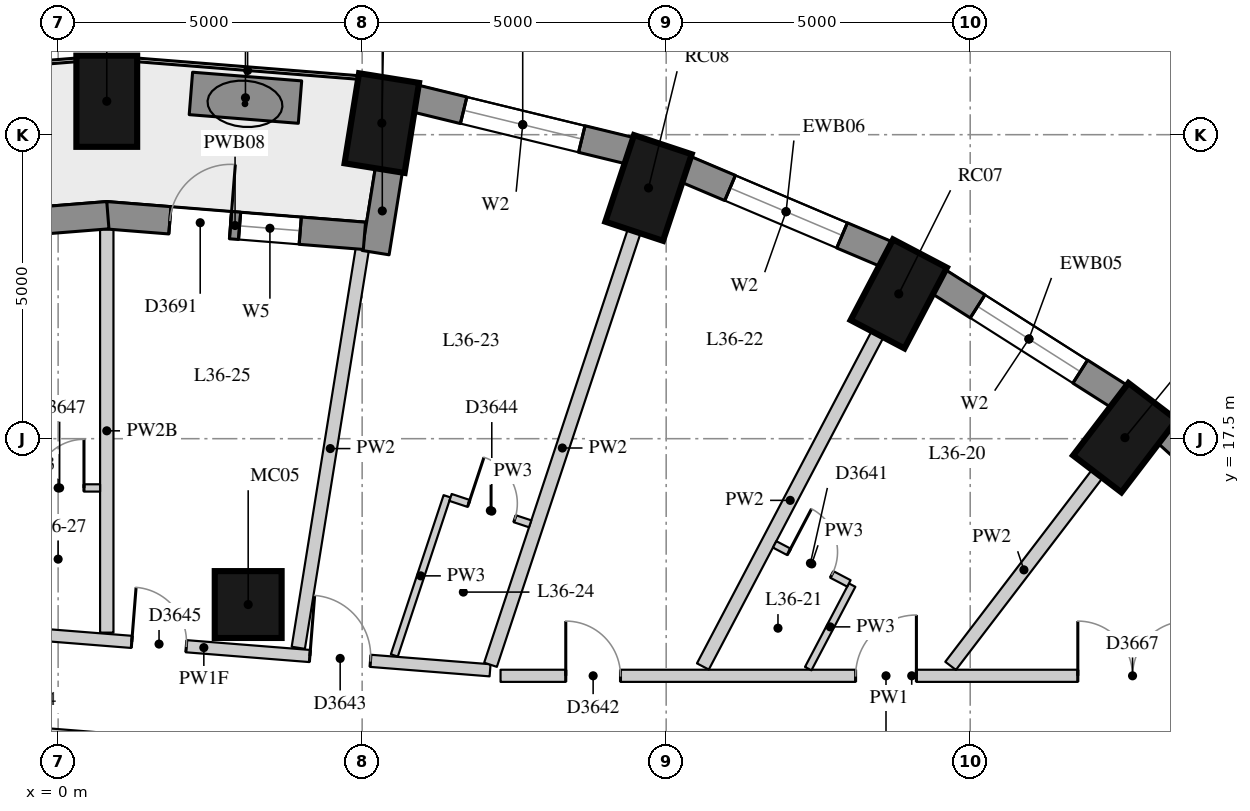
"""IFC4 building model, lengths in metres.
Left out: names, types, materials, properties, quantities, classifications, styles, units other than length and angle.
Written with IfcOpenShell. Run it as: python <this file> out.ifc"""

import sys

from ifc_helpers import new_model, si_unit, direction, frame, frame_2d, origin, origin_2d, place, context, subcontext, project, spatial, rectangle, extrude, element, fill, save


model = new_model("IFC4")
c1 = context("Model", 3, precision=1e-05, world=origin(), true_north=direction((0.0, 1.0)))
c2 = subcontext(c1, "Body", "Model", "MODEL_VIEW")
j1 = project(units=[si_unit("LENGTHUNIT", "METRE"), si_unit("PLANEANGLEUNIT", "RADIAN")], contexts=[c1])
p1 = place(None, origin())
s1 = spatial("IfcSite", under=j1, at=p1, CompositionType="ELEMENT")
p2 = place(p1, origin())
s2 = spatial("IfcBuilding", under=s1, at=p2, CompositionType="ELEMENT")
p3 = place(p2, frame((0.0, 0.0, 128.5)))
s3 = spatial("IfcBuildingStorey", under=s2, at=p3, CompositionType="ELEMENT", Elevation=128.5)
for number, where, z_axis, x_axis in (
    (1, (17.545, 17.517, 0.0), (0.0, 0.0, 1.0), (0.607, 0.795, 0.0)),
    (2, (13.825, 19.882, 0.0), (0.0, 0.0, 1.0), (0.465, 0.885, 0.0)),
    (3, (9.71, 21.624, 0.0), (0.0, 0.0, 1.0), (0.315, 0.949, 0.0)),
    (4, (5.323, 22.691, 0.0), (0.0, 0.0, 1.0), (0.159, 0.987, 0.0)),
    (5, (0.8, 23.05, 0.0), (0.0, 0.0, 1.0), (0.0, 1.0, 0.0)),
):
    element("IfcColumn", number, at=place(p3, frame(where, z_axis=z_axis, x_axis=x_axis)), inside=s3, PredefinedType="COLUMN", context=c2, shape_type="SweptSolid", body=[
        extrude(rectangle(XDim=1.5, YDim=1.0, at=origin_2d()), origin(), (0.0, 0.0, 1.0), 3.3),
    ])
p4 = place(p3, frame((3.126, 14.772, 0.0), z_axis=(0.0, 0.0, 1.0), x_axis=(1.0, 0.0, 0.0)))
e6 = element("IfcColumn", 6, at=p4, inside=s3, PredefinedType="COLUMN", context=c2, shape_type="SweptSolid", body=[
    extrude(rectangle(XDim=1.1, YDim=1.1, at=origin_2d()), origin(), (0.0, 0.0, 1.0), 3.3),
])
p5 = place(p3, frame((20.784, 15.281, 0.0), z_axis=(0.0, 0.0, 1.0), x_axis=(-0.74032902847, 0.672244694739, 0.0)))
e7 = element("IfcWall", 7, at=p5, inside=s3, PredefinedType="SOLIDWALL", context=c2, shape_type="SweptSolid", body=[
    extrude(rectangle(XDim=3.464, YDim=0.45, at=frame_2d((1.732, 0.0))), origin(), (0.0, 0.0, 1.0), 3.02),
])
p6 = place(p3, frame((17.456, 18.192, 0.0), z_axis=(0.0, 0.0, 1.0), x_axis=(-0.843880549131, 0.536531097699, 0.0)))
e8 = element("IfcWall", 8, at=p6, inside=s3, PredefinedType="SOLIDWALL", context=c2, shape_type="SweptSolid", body=[
    extrude(rectangle(XDim=3.532, YDim=0.45, at=frame_2d((1.766, 0.0))), origin(), (0.0, 0.0, 1.0), 3.02),
])
p7 = place(p6, frame((0.766, 0.0, 0.4)))
e9 = element("IfcOpeningElement", 9, at=p7, cuts=e8, PredefinedType="OPENING", context=c2, shape_type="SweptSolid", body=[
    extrude(rectangle(XDim=2.0, YDim=1.75, at=frame_2d((1.0, 0.875))), frame((0.0, 0.235, 0.0), z_axis=(0.0, -1.0, 0.0), x_axis=(1.0, 0.0, 0.0)), (0.0, 0.0, 1.0), 0.47),
])
p8 = place(p3, frame((13.625, 20.533, 0.0), z_axis=(0.0, 0.0, 1.0), x_axis=(-0.920869643542, 0.389870619055, 0.0)))
e10 = element("IfcWall", 10, at=p8, inside=s3, PredefinedType="SOLIDWALL", context=c2, shape_type="SweptSolid", body=[
    extrude(rectangle(XDim=3.591, YDim=0.45, at=frame_2d((1.796, 0.0))), origin(), (0.0, 0.0, 1.0), 3.02),
])
p9 = place(p8, frame((0.796, 0.0, 0.4)))
e11 = element("IfcOpeningElement", 11, at=p9, cuts=e10, PredefinedType="OPENING", context=c2, shape_type="SweptSolid", body=[
    extrude(rectangle(XDim=2.0, YDim=1.75, at=frame_2d((1.0, 0.875))), frame((0.0, 0.235, 0.0), z_axis=(0.0, -1.0, 0.0), x_axis=(1.0, 0.0, 0.0)), (0.0, 0.0, 1.0), 0.47),
])
p10 = place(p3, frame((9.406, 22.235, 0.0), z_axis=(0.0, 0.0, 1.0), x_axis=(-0.971667603162, 0.236351579148, 0.0)))
e12 = element("IfcWall", 12, at=p10, inside=s3, PredefinedType="SOLIDWALL", context=c2, shape_type="SweptSolid", body=[
    extrude(rectangle(XDim=3.635, YDim=0.45, at=frame_2d((1.817, 0.0))), origin(), (0.0, 0.0, 1.0), 3.02),
])
p11 = place(p10, frame((0.817, 0.0, 0.4)))
e13 = element("IfcOpeningElement", 13, at=p11, cuts=e12, PredefinedType="OPENING", context=c2, shape_type="SweptSolid", body=[
    extrude(rectangle(XDim=2.0, YDim=1.75, at=frame_2d((1.0, 0.875))), frame((0.0, 0.235, 0.0), z_axis=(0.0, -1.0, 0.0), x_axis=(1.0, 0.0, 0.0)), (0.0, 0.0, 1.0), 0.47),
])
p12 = place(p3, frame((5.441, 21.932, 0.0), z_axis=(0.0, 0.0, 1.0), x_axis=(-0.158586380547, -0.987345106792, 0.0)))
e14 = element("IfcWall", 14, at=p12, inside=s3, PredefinedType="SOLIDWALL", context=c2, shape_type="SweptSolid", body=[
    extrude(rectangle(XDim=1.39, YDim=0.45, at=frame_2d((0.695, 0.0))), origin(), (0.0, 0.0, 1.0), 3.02),
])
p13 = place(p3, frame((5.038, 20.837, 0.0), z_axis=(0.0, 0.0, 1.0), x_axis=(-0.996839780714, 0.079438350855, 0.0)))
e15 = element("IfcWall", 15, at=p13, inside=s3, PredefinedType="SOLIDWALL", context=c2, shape_type="SweptSolid", body=[
    extrude(rectangle(XDim=4.269, YDim=0.45, at=frame_2d((2.134, 0.0))), origin(), (0.0, 0.0, 1.0), 3.02),
])
p14 = place(p13, frame((1.06, 0.0, 0.4)))
e16 = element("IfcOpeningElement", 16, at=p14, cuts=e15, PredefinedType="OPENING", context=c2, shape_type="SweptSolid", body=[
    extrude(rectangle(XDim=1.0, YDim=1.75, at=frame_2d((0.5, 0.875))), frame((0.0, 0.235, 0.0), z_axis=(0.0, -1.0, 0.0), x_axis=(1.0, 0.0, 0.0)), (0.0, 0.0, 1.0), 0.47),
])
p15 = place(p13, frame((2.209, 0.0, 0.0)))
e17 = element("IfcOpeningElement", 17, at=p15, cuts=e15, PredefinedType="OPENING", context=c2, shape_type="SweptSolid", body=[
    extrude(rectangle(XDim=1.0, YDim=2.15, at=frame_2d((0.5, 1.075))), frame((0.0, 0.235, 0.0), z_axis=(0.0, -1.0, 0.0), x_axis=(1.0, 0.0, 0.0)), (0.0, 0.0, 1.0), 0.47),
])
p16 = place(p3, frame((0.818, 21.176, 0.0), z_axis=(0.0, 0.0, 1.0), x_axis=(-0.996843824935, -0.079387585235, 0.0)))
e18 = element("IfcWall", 18, at=p16, inside=s3, PredefinedType="SOLIDWALL", context=c2, shape_type="SweptSolid", body=[
    extrude(rectangle(XDim=4.287, YDim=0.45, at=frame_2d((2.144, 0.0))), origin(), (0.0, 0.0, 1.0), 3.02),
])
p17 = place(p16, frame((1.068, 0.0, 0.4)))
e19 = element("IfcOpeningElement", 19, at=p17, cuts=e18, PredefinedType="OPENING", context=c2, shape_type="SweptSolid", body=[
    extrude(rectangle(XDim=1.0, YDim=1.75, at=frame_2d((0.5, 0.875))), frame((0.0, 0.235, 0.0), z_axis=(0.0, -1.0, 0.0), x_axis=(1.0, 0.0, 0.0)), (0.0, 0.0, 1.0), 0.47),
])
p18 = place(p16, frame((2.219, 0.0, 0.0)))
e20 = element("IfcOpeningElement", 20, at=p18, cuts=e18, PredefinedType="OPENING", context=c2, shape_type="SweptSolid", body=[
    extrude(rectangle(XDim=1.0, YDim=2.15, at=frame_2d((0.5, 1.075))), frame((0.0, 0.235, 0.0), z_axis=(0.0, -1.0, 0.0), x_axis=(1.0, 0.0, 0.0)), (0.0, 0.0, 1.0), 0.47),
])
p19 = place(p3, frame((3.978, 23.036, 0.0), z_axis=(0.0, 0.0, 1.0), x_axis=(-0.996858257414, 0.079206152698, 0.0)))
e21 = element("IfcWall", 21, at=p19, inside=s3, PredefinedType="USERDEFINED", context=c2, shape_type="SweptSolid", body=[
    extrude(rectangle(XDim=1.8, YDim=0.7, at=frame_2d((0.9, 0.0))), origin(), (0.0, 0.0, 1.0), 0.75),
])
p20 = place(p3, frame((-2.311, 14.437, 0.0), z_axis=(0.0, 0.0, 1.0), x_axis=(0.996870762165, -0.079048615048, 0.0)))
e22 = element("IfcWall", 22, at=p20, inside=s3, PredefinedType="PARTITIONING", context=c2, shape_type="SweptSolid", body=[
    extrude(rectangle(XDim=9.445, YDim=0.2, at=frame_2d((4.722, 0.0))), origin(), (0.0, 0.0, 1.0), 2.42),
])
p21 = place(p20, frame((6.471, 0.0, 0.0)))
e23 = element("IfcOpeningElement", 23, at=p21, cuts=e22, PredefinedType="OPENING", context=c2, shape_type="SweptSolid", body=[
    extrude(rectangle(XDim=1.0, YDim=2.1, at=frame_2d((0.5, 1.05))), frame((0.0, 0.11, 0.0), z_axis=(0.0, -1.0, 0.0), x_axis=(1.0, 0.0, 0.0)), (0.0, 0.0, 1.0), 0.22),
])
p22 = place(p20, frame((3.533, 0.0, 0.0)))
e24 = element("IfcOpeningElement", 24, at=p22, cuts=e22, PredefinedType="OPENING", context=c2, shape_type="SweptSolid", body=[
    extrude(rectangle(XDim=0.9, YDim=2.1, at=frame_2d((0.45, 1.05))), frame((0.0, 0.11, 0.0), z_axis=(0.0, -1.0, 0.0), x_axis=(1.0, 0.0, 0.0)), (0.0, 0.0, 1.0), 0.22),
])
p23 = place(p20, frame((0.22, 0.0, 0.0)))
e25 = element("IfcOpeningElement", 25, at=p23, cuts=e22, PredefinedType="OPENING", context=c2, shape_type="SweptSolid", body=[
    extrude(rectangle(XDim=1.0, YDim=2.1, at=frame_2d((0.5, 1.05))), frame((0.0, 0.11, 0.0), z_axis=(0.0, -1.0, 0.0), x_axis=(1.0, 0.0, 0.0)), (0.0, 0.0, 1.0), 0.22),
])
p24 = place(p3, frame((7.276, 13.6, 0.0), z_axis=(0.0, 0.0, 1.0), x_axis=(1.0, 0.0, 0.0)))
e26 = element("IfcWall", 26, at=p24, inside=s3, PredefinedType="PARTITIONING", context=c2, shape_type="SweptSolid", body=[
    extrude(rectangle(XDim=13.524, YDim=0.2, at=frame_2d((6.762, 0.0))), origin(), (0.0, 0.0, 1.0), 3.02),
])
p25 = place(p24, frame((5.839, 0.0, 0.0)))
e27 = element("IfcOpeningElement", 27, at=p25, cuts=e26, PredefinedType="OPENING", context=c2, shape_type="SweptSolid", body=[
    extrude(rectangle(XDim=1.0, YDim=2.1, at=frame_2d((0.5, 1.05))), frame((0.0, 0.11, 0.0), z_axis=(0.0, -1.0, 0.0), x_axis=(1.0, 0.0, 0.0)), (0.0, 0.0, 1.0), 0.22),
])
p26 = place(p24, frame((1.073, 0.0, 0.0)))
e28 = element("IfcOpeningElement", 28, at=p26, cuts=e26, PredefinedType="OPENING", context=c2, shape_type="SweptSolid", body=[
    extrude(rectangle(XDim=0.9, YDim=2.1, at=frame_2d((0.45, 1.05))), frame((0.0, 0.11, 0.0), z_axis=(0.0, -1.0, 0.0), x_axis=(1.0, 0.0, 0.0)), (0.0, 0.0, 1.0), 0.22),
])
p27 = place(p24, frame((9.494, 0.0, 0.0)))
e29 = element("IfcOpeningElement", 29, at=p27, cuts=e26, PredefinedType="OPENING", context=c2, shape_type="SweptSolid", body=[
    extrude(rectangle(XDim=1.8, YDim=2.1, at=frame_2d((0.9, 1.05))), frame((0.0, 0.11, 0.0), z_axis=(0.0, -1.0, 0.0), x_axis=(1.0, 0.0, 0.0)), (0.0, 0.0, 1.0), 0.22),
])
p28 = place(p3, frame((-2.109, 12.816, 0.0), z_axis=(0.0, 0.0, 1.0), x_axis=(0.996868431192, -0.079078005119, 0.0)))
e30 = element("IfcWall", 30, at=p28, inside=s3, PredefinedType="PARTITIONING", context=c2, shape_type="SweptSolid", body=[
    extrude(rectangle(XDim=3.52, YDim=0.15, at=frame_2d((1.76, 0.0))), origin(), (0.0, 0.0, 1.0), 3.02),
])
p29 = place(p3, frame((17.089, 16.921, 0.0), z_axis=(0.0, 0.0, 1.0), x_axis=(-0.607055443677, -0.794659479464, 0.0)))
e31 = element("IfcWall", 31, at=p29, inside=s3, PredefinedType="PARTITIONING", context=c2, shape_type="SweptSolid", body=[
    extrude(rectangle(XDim=3.973, YDim=0.22, at=frame_2d((1.987, 0.0))), origin(), (0.0, 0.0, 1.0), 3.02),
])
p30 = place(p3, frame((13.476, 19.218, 0.0), z_axis=(0.0, 0.0, 1.0), x_axis=(-0.465345394262, -0.885129179295, 0.0)))
e32 = element("IfcWall", 32, at=p30, inside=s3, PredefinedType="PARTITIONING", context=c2, shape_type="SweptSolid", body=[
    extrude(rectangle(XDim=6.173, YDim=0.22, at=frame_2d((3.086, 0.0))), origin(), (0.0, 0.0, 1.0), 3.02),
])
p31 = place(p3, frame((9.474, 20.912, 0.0), z_axis=(0.0, 0.0, 1.0), x_axis=(-0.314530608669, -0.949247331421, 0.0)))
e33 = element("IfcWall", 33, at=p31, inside=s3, PredefinedType="PARTITIONING", context=c2, shape_type="SweptSolid", body=[
    extrude(rectangle(XDim=7.511, YDim=0.22, at=frame_2d((3.756, 0.0))), origin(), (0.0, 0.0, 1.0), 3.02),
])
p32 = place(p3, frame((5.002, 20.614, 0.0), z_axis=(0.0, 0.0, 1.0), x_axis=(-0.158502645231, -0.987358552632, 0.0)))
e34 = element("IfcWall", 34, at=p32, inside=s3, PredefinedType="PARTITIONING", context=c2, shape_type="SweptSolid", body=[
    extrude(rectangle(XDim=6.637, YDim=0.22, at=frame_2d((3.319, 0.0))), origin(), (0.0, 0.0, 1.0), 3.02),
])
p33 = place(p3, frame((0.8, 20.948, 0.0), z_axis=(0.0, 0.0, 1.0), x_axis=(0.0, -1.0, 0.0)))
e35 = element("IfcWall", 35, at=p33, inside=s3, PredefinedType="PARTITIONING", context=c2, shape_type="SweptSolid", body=[
    extrude(rectangle(XDim=6.638, YDim=0.22, at=frame_2d((3.319, 0.0))), origin(), (0.0, 0.0, 1.0), 2.57),
])
p34 = place(p3, frame((12.336, 13.718, 0.0), z_axis=(0.0, 0.0, 1.0), x_axis=(0.465428746876, 0.88508535271, 0.0)))
e36 = element("IfcWall", 36, at=p34, inside=s3, PredefinedType="PARTITIONING", context=c2, shape_type="SweptSolid", body=[
    extrude(rectangle(XDim=1.552, YDim=0.12, at=frame_2d((0.776, 0.0))), origin(), (0.0, 0.0, 1.0), 3.02),
])
p35 = place(p3, frame((5.529, 13.935, 0.0), z_axis=(0.0, 0.0, 1.0), x_axis=(0.31455402028, 0.949239573725, 0.0)))
e37 = element("IfcWall", 37, at=p35, inside=s3, PredefinedType="PARTITIONING", context=c2, shape_type="SweptSolid", body=[
    extrude(rectangle(XDim=2.758, YDim=0.12, at=frame_2d((1.379, 0.0))), origin(), (0.0, 0.0, 1.0), 3.02),
])
p36 = place(p3, frame((13.005, 15.12, 0.0), z_axis=(0.0, 0.0, 1.0), x_axis=(-0.885148383454, 0.465308864378, 0.0)))
e38 = element("IfcWall", 38, at=p36, inside=s3, PredefinedType="PARTITIONING", context=c2, shape_type="SweptSolid", body=[
    extrude(rectangle(XDim=1.38, YDim=0.12, at=frame_2d((0.69, 0.0))), origin(), (0.0, 0.0, 1.0), 3.02),
])
p37 = place(p36, frame((0.315, 0.0, 0.0)))
e39 = element("IfcOpeningElement", 39, at=p37, cuts=e38, PredefinedType="OPENING", context=c2, shape_type="SweptSolid", body=[
    extrude(rectangle(XDim=0.8, YDim=2.1, at=frame_2d((0.4, 1.05))), frame((0.0, 0.07, 0.0), z_axis=(0.0, -1.0, 0.0), x_axis=(1.0, 0.0, 0.0)), (0.0, 0.0, 1.0), 0.14),
])
p38 = place(p3, frame((6.454, 16.534, 0.0), z_axis=(0.0, 0.0, 1.0), x_axis=(0.949265680417, -0.314475226342, 0.0)))
e40 = element("IfcWall", 40, at=p38, inside=s3, PredefinedType="PARTITIONING", context=c2, shape_type="SweptSolid", body=[
    extrude(rectangle(XDim=1.38, YDim=0.12, at=frame_2d((0.69, 0.0))), origin(), (0.0, 0.0, 1.0), 3.02),
])
p39 = place(p38, frame((0.315, 0.0, 0.0)))
e41 = element("IfcOpeningElement", 41, at=p39, cuts=e40, PredefinedType="OPENING", context=c2, shape_type="SweptSolid", body=[
    extrude(rectangle(XDim=0.8, YDim=2.1, at=frame_2d((0.4, 1.05))), frame((0.0, 0.07, 0.0), z_axis=(0.0, -1.0, 0.0), x_axis=(1.0, 0.0, 0.0)), (0.0, 0.0, 1.0), 0.14),
])
p40 = place(p3, frame((-0.69, 16.69, 0.0), z_axis=(0.0, 0.0, 1.0), x_axis=(1.0, 0.0, 0.0)))
e42 = element("IfcWall", 42, at=p40, inside=s3, PredefinedType="PARTITIONING", context=c2, shape_type="SweptSolid", body=[
    extrude(rectangle(XDim=1.38, YDim=0.12, at=frame_2d((0.69, 0.0))), origin(), (0.0, 0.0, 1.0), 3.02),
])
p41 = place(p40, frame((0.315, 0.0, 0.0)))
e43 = element("IfcOpeningElement", 43, at=p41, cuts=e42, PredefinedType="OPENING", context=c2, shape_type="SweptSolid", body=[
    extrude(rectangle(XDim=0.8, YDim=2.1, at=frame_2d((0.4, 1.05))), frame((0.0, 0.07, 0.0), z_axis=(0.0, -1.0, 0.0), x_axis=(1.0, 0.0, 0.0)), (0.0, 0.0, 1.0), 0.14),
])
p42 = place(p7, origin())
e44 = element("IfcWindow", 44, at=p42, inside=s3, PartitioningType="SINGLE_PANEL", PredefinedType="WINDOW", context=c2, shape_type="SweptSolid", body=[
    extrude(rectangle(XDim=2.0, YDim=1.75, at=frame_2d((1.0, 0.875))), frame((0.0, 0.035, 0.0), z_axis=(0.0, -1.0, 0.0), x_axis=(1.0, 0.0, 0.0)), (0.0, 0.0, 1.0), 0.06),
])
fill(e9, e44)
p43 = place(p9, origin())
e45 = element("IfcWindow", 45, at=p43, inside=s3, PartitioningType="SINGLE_PANEL", PredefinedType="WINDOW", context=c2, shape_type="SweptSolid", body=[
    extrude(rectangle(XDim=2.0, YDim=1.75, at=frame_2d((1.0, 0.875))), frame((0.0, 0.035, 0.0), z_axis=(0.0, -1.0, 0.0), x_axis=(1.0, 0.0, 0.0)), (0.0, 0.0, 1.0), 0.06),
])
fill(e11, e45)
p44 = place(p11, origin())
e46 = element("IfcWindow", 46, at=p44, inside=s3, PartitioningType="SINGLE_PANEL", PredefinedType="WINDOW", context=c2, shape_type="SweptSolid", body=[
    extrude(rectangle(XDim=2.0, YDim=1.75, at=frame_2d((1.0, 0.875))), frame((0.0, 0.035, 0.0), z_axis=(0.0, -1.0, 0.0), x_axis=(1.0, 0.0, 0.0)), (0.0, 0.0, 1.0), 0.06),
])
fill(e13, e46)
p45 = place(p14, origin())
e47 = element("IfcWindow", 47, at=p45, inside=s3, PartitioningType="SINGLE_PANEL", PredefinedType="WINDOW", context=c2, shape_type="SweptSolid", body=[
    extrude(rectangle(XDim=1.0, YDim=1.75, at=frame_2d((0.5, 0.875))), frame((0.0, 0.035, 0.0), z_axis=(0.0, -1.0, 0.0), x_axis=(1.0, 0.0, 0.0)), (0.0, 0.0, 1.0), 0.06),
])
fill(e16, e47)
p46 = place(p15, frame((1.0, 0.0, 0.0), z_axis=(0.0, 0.0, 1.0), x_axis=(-1.0, 0.0, 0.0)))
e48 = element("IfcDoor", 48, at=p46, inside=s3, OperationType="SINGLE_SWING_RIGHT", PredefinedType="DOOR", context=c2, shape_type="SweptSolid", body=[
    extrude(rectangle(XDim=1.0, YDim=2.15, at=frame_2d((0.5, 1.075))), frame((0.0, 0.075, 0.0), z_axis=(0.0, -1.0, 0.0), x_axis=(1.0, 0.0, 0.0)), (0.0, 0.0, 1.0), 0.05),
])
fill(e17, e48)
p47 = place(p25, origin())
e49 = element("IfcDoor", 49, at=p47, inside=s3, OperationType="SINGLE_SWING_RIGHT", PredefinedType="DOOR", context=c2, shape_type="SweptSolid", body=[
    extrude(rectangle(XDim=1.0, YDim=2.1, at=frame_2d((0.5, 1.05))), frame((0.0, 0.025, 0.0), z_axis=(0.0, -1.0, 0.0), x_axis=(1.0, 0.0, 0.0)), (0.0, 0.0, 1.0), 0.05),
])
fill(e27, e49)
p48 = place(p37, origin())
e50 = element("IfcDoor", 50, at=p48, inside=s3, OperationType="SINGLE_SWING_LEFT", PredefinedType="DOOR", context=c2, shape_type="SweptSolid", body=[
    extrude(rectangle(XDim=0.8, YDim=2.1, at=frame_2d((0.4, 1.05))), frame((0.0, 0.025, 0.0), z_axis=(0.0, -1.0, 0.0), x_axis=(1.0, 0.0, 0.0)), (0.0, 0.0, 1.0), 0.05),
])
fill(e39, e50)
p49 = place(p26, origin())
e51 = element("IfcDoor", 51, at=p49, inside=s3, OperationType="SINGLE_SWING_LEFT", PredefinedType="DOOR", context=c2, shape_type="SweptSolid", body=[
    extrude(rectangle(XDim=0.9, YDim=2.1, at=frame_2d((0.45, 1.05))), frame((0.0, 0.025, 0.0), z_axis=(0.0, -1.0, 0.0), x_axis=(1.0, 0.0, 0.0)), (0.0, 0.0, 1.0), 0.05),
])
fill(e28, e51)
p50 = place(p21, origin())
e52 = element("IfcDoor", 52, at=p50, inside=s3, OperationType="SINGLE_SWING_LEFT", PredefinedType="DOOR", context=c2, shape_type="SweptSolid", body=[
    extrude(rectangle(XDim=1.0, YDim=2.1, at=frame_2d((0.5, 1.05))), frame((0.0, 0.025, 0.0), z_axis=(0.0, -1.0, 0.0), x_axis=(1.0, 0.0, 0.0)), (0.0, 0.0, 1.0), 0.05),
])
fill(e23, e52)
p51 = place(p39, origin())
e53 = element("IfcDoor", 53, at=p51, inside=s3, OperationType="SINGLE_SWING_LEFT", PredefinedType="DOOR", context=c2, shape_type="SweptSolid", body=[
    extrude(rectangle(XDim=0.8, YDim=2.1, at=frame_2d((0.4, 1.05))), frame((0.0, 0.025, 0.0), z_axis=(0.0, -1.0, 0.0), x_axis=(1.0, 0.0, 0.0)), (0.0, 0.0, 1.0), 0.05),
])
fill(e41, e53)
p52 = place(p22, origin())
e54 = element("IfcDoor", 54, at=p52, inside=s3, OperationType="SINGLE_SWING_LEFT", PredefinedType="DOOR", context=c2, shape_type="SweptSolid", body=[
    extrude(rectangle(XDim=0.9, YDim=2.1, at=frame_2d((0.45, 1.05))), frame((0.0, 0.025, 0.0), z_axis=(0.0, -1.0, 0.0), x_axis=(1.0, 0.0, 0.0)), (0.0, 0.0, 1.0), 0.05),
])
fill(e24, e54)
p53 = place(p41, origin())
e55 = element("IfcDoor", 55, at=p53, inside=s3, OperationType="SINGLE_SWING_RIGHT", PredefinedType="DOOR", context=c2, shape_type="SweptSolid", body=[
    extrude(rectangle(XDim=0.8, YDim=2.1, at=frame_2d((0.4, 1.05))), frame((0.0, 0.025, 0.0), z_axis=(0.0, -1.0, 0.0), x_axis=(1.0, 0.0, 0.0)), (0.0, 0.0, 1.0), 0.05),
])
fill(e43, e55)
p54 = place(p27, origin())
e56 = element("IfcDoor", 56, at=p54, inside=s3, OperationType="DOUBLE_DOOR_SINGLE_SWING", PredefinedType="DOOR", context=c2, shape_type="SweptSolid", body=[
    extrude(rectangle(XDim=1.8, YDim=2.1, at=frame_2d((0.9, 1.05))), frame((0.0, 0.025, 0.0), z_axis=(0.0, -1.0, 0.0), x_axis=(1.0, 0.0, 0.0)), (0.0, 0.0, 1.0), 0.05),
])
fill(e29, e56)
save(model, sys.argv[1])
